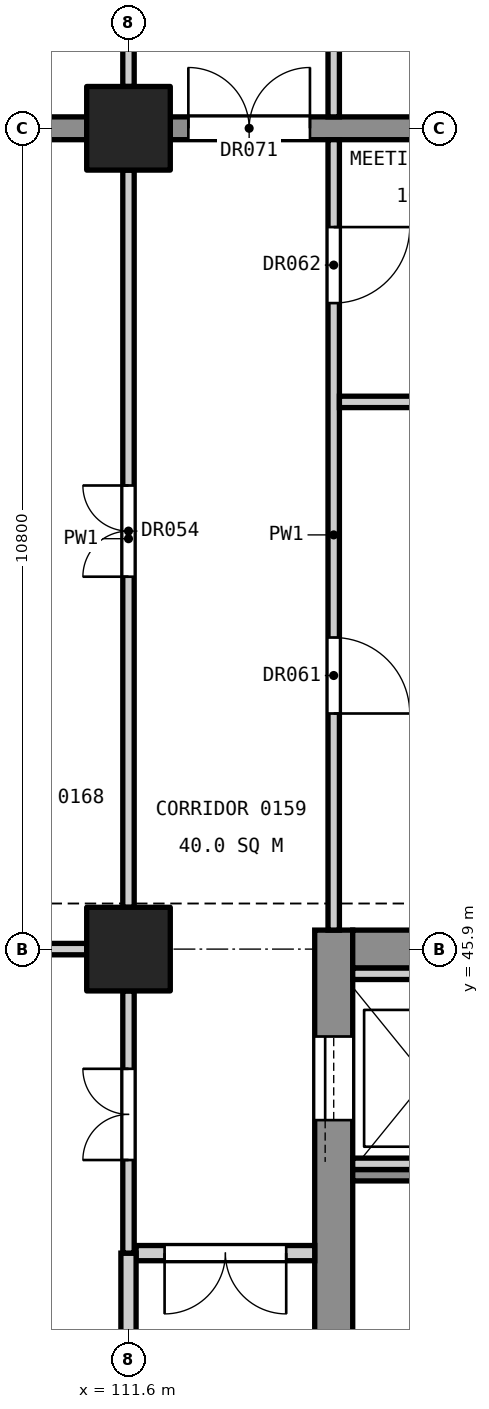
"""IFC4 building model, lengths in metres.
Left out: names, types, materials, properties, quantities, classifications, styles, units other than length and angle.
Written with IfcOpenShell. Run it as: python <this file> out.ifc"""

import sys

from ifc_helpers import new_model, si_unit, direction, frame, frame_2d, origin, origin_2d, place, context, subcontext, project, spatial, rectangle, extrude, element, fill, save


model = new_model("IFC4")
c1 = context("Model", 3, precision=1e-05, world=origin(), true_north=direction((0.0, 1.0)))
c2 = subcontext(c1, "Body", "Model", "MODEL_VIEW")
j1 = project(units=[si_unit("LENGTHUNIT", "METRE"), si_unit("PLANEANGLEUNIT", "RADIAN")], contexts=[c1])
p1 = place(None, origin())
s1 = spatial("IfcSite", under=j1, at=p1, CompositionType="ELEMENT")
p2 = place(p1, origin())
s2 = spatial("IfcBuilding", under=s1, at=p2, CompositionType="ELEMENT")
p3 = place(p2, frame((0.0, 0.0, 6.0)))
s3 = spatial("IfcBuildingStorey", under=s2, at=p3, CompositionType="ELEMENT", Elevation=6.0)
for number, where, z_axis, x_axis in (
    (1, (111.6, 45.9, 0.0), (0.0, 0.0, 1.0), (1.0, 0.0, 0.0)),
    (2, (111.6, 56.7, 0.0), (0.0, 0.0, 1.0), (1.0, 0.0, 0.0)),
):
    element("IfcColumn", number, at=place(p3, frame(where, z_axis=z_axis, x_axis=x_axis)), inside=s3, PredefinedType="COLUMN", context=c2, shape_type="SweptSolid", body=[
        extrude(rectangle(XDim=1.1, YDim=1.1, at=origin_2d()), origin(), (0.0, 0.0, 1.0), 5.4),
    ])
p4 = place(p3, frame((114.3, 34.85, 0.0), z_axis=(0.0, 0.0, 1.0), x_axis=(0.0, 1.0, 0.0)))
e3 = element("IfcWall", 3, at=p4, inside=s3, PredefinedType="SHEAR", context=c2, shape_type="SweptSolid", body=[
    extrude(rectangle(XDim=11.3, YDim=0.5, at=frame_2d((5.65, 0.0))), origin(), (0.0, 0.0, 1.0), 5.1),
])
p5 = place(p4, frame((0.55, 0.0, 0.0)))
e4 = element("IfcOpeningElement", 4, at=p5, cuts=e3, PredefinedType="OPENING", context=c2, shape_type="SweptSolid", body=[
    extrude(rectangle(XDim=1.4, YDim=2.1, at=frame_2d((0.7, 1.05))), frame((0.0, 0.26, 0.0), z_axis=(0.0, -1.0, 0.0), x_axis=(1.0, 0.0, 0.0)), (0.0, 0.0, 1.0), 0.52),
])
p6 = place(p4, frame((8.8, 0.0, 0.0)))
e5 = element("IfcOpeningElement", 5, at=p6, cuts=e3, PredefinedType="OPENING", context=c2, shape_type="SweptSolid", body=[
    extrude(rectangle(XDim=1.1, YDim=2.1, at=frame_2d((0.55, 1.05))), frame((0.0, 0.26, 0.0), z_axis=(0.0, -1.0, 0.0), x_axis=(1.0, 0.0, 0.0)), (0.0, 0.0, 1.0), 0.52),
])
p7 = place(p3, frame((118.55, 45.9, 0.0), z_axis=(0.0, 0.0, 1.0), x_axis=(-1.0, 0.0, 0.0)))
e6 = element("IfcWall", 6, at=p7, inside=s3, PredefinedType="SHEAR", context=c2, shape_type="SweptSolid", body=[
    extrude(rectangle(XDim=4.0, YDim=0.5, at=frame_2d((2.0, 0.0))), origin(), (0.0, 0.0, 1.0), 5.1),
])
p8 = place(p3, frame((118.25, 56.7, 0.0), z_axis=(0.0, 0.0, 1.0), x_axis=(-1.0, 0.0, 0.0)))
e7 = element("IfcWall", 7, at=p8, inside=s3, PredefinedType="SHEAR", context=c2, shape_type="SweptSolid", body=[
    extrude(rectangle(XDim=6.1, YDim=0.3, at=frame_2d((3.05, 0.0))), origin(), (0.0, 0.0, 1.0), 5.1),
])
p9 = place(p8, frame((4.262, 0.0, 0.0)))
e8 = element("IfcOpeningElement", 8, at=p9, cuts=e7, PredefinedType="OPENING", context=c2, shape_type="SweptSolid", body=[
    extrude(rectangle(XDim=1.6, YDim=2.1, at=frame_2d((0.8, 1.05))), frame((0.0, 0.16, 0.0), z_axis=(0.0, -1.0, 0.0), x_axis=(1.0, 0.0, 0.0)), (0.0, 0.0, 1.0), 0.32),
])
p10 = place(p3, frame((111.05, 56.7, 0.0), z_axis=(0.0, 0.0, 1.0), x_axis=(-1.0, 0.0, 0.0)))
e9 = element("IfcWall", 9, at=p10, inside=s3, PredefinedType="SHEAR", context=c2, shape_type="SweptSolid", body=[
    extrude(rectangle(XDim=9.7, YDim=0.3, at=frame_2d((4.85, 0.0))), origin(), (0.0, 0.0, 1.0), 5.1),
])
p11 = place(p3, frame((118.55, 42.925, 0.0), z_axis=(0.0, 0.0, 1.0), x_axis=(-1.0, 0.0, 0.0)))
e10 = element("IfcWall", 10, at=p11, inside=s3, PredefinedType="SOLIDWALL", context=c2, shape_type="SweptSolid", body=[
    extrude(rectangle(XDim=4.0, YDim=0.15, at=frame_2d((2.0, 0.0))), origin(), (0.0, 0.0, 1.0), 5.1),
])
for number, where, z_axis, x_axis in (
    (11, (116.35, 43.075, 0.0), (0.0, 0.0, 1.0), (-1.0, 0.0, 0.0)),
    (12, (116.35, 45.575, 0.0), (0.0, 0.0, 1.0), (-1.0, 0.0, 0.0)),
):
    element("IfcWall", number, at=place(p3, frame(where, z_axis=z_axis, x_axis=x_axis)), inside=s3, PredefinedType="SOLIDWALL", context=c2, shape_type="SweptSolid", body=[
        extrude(rectangle(XDim=1.8, YDim=0.15, at=frame_2d((0.9, 0.0))), origin(), (0.0, 0.0, 1.0), 5.4),
    ])
p12 = place(p3, frame((114.3, 46.15, 0.0), z_axis=(0.0, 0.0, 1.0), x_axis=(0.0, 1.0, 0.0)))
e13 = element("IfcWall", 13, at=p12, inside=s3, PredefinedType="PARTITIONING", context=c2, shape_type="SweptSolid", body=[
    extrude(rectangle(XDim=10.4, YDim=0.15, at=frame_2d((5.2, 0.0))), origin(), (0.0, 0.0, 1.0), 4.0),
])
p13 = place(p12, frame((2.85, 0.0, 0.0)))
e14 = element("IfcOpeningElement", 14, at=p13, cuts=e13, PredefinedType="OPENING", context=c2, shape_type="SweptSolid", body=[
    extrude(rectangle(XDim=1.0, YDim=2.1, at=frame_2d((0.5, 1.05))), frame((0.0, 0.085, 0.0), z_axis=(0.0, -1.0, 0.0), x_axis=(1.0, 0.0, 0.0)), (0.0, 0.0, 1.0), 0.17),
])
p14 = place(p12, frame((8.25, 0.0, 0.0)))
e15 = element("IfcOpeningElement", 15, at=p14, cuts=e13, PredefinedType="OPENING", context=c2, shape_type="SweptSolid", body=[
    extrude(rectangle(XDim=1.0, YDim=2.1, at=frame_2d((0.5, 1.05))), frame((0.0, 0.085, 0.0), z_axis=(0.0, -1.0, 0.0), x_axis=(1.0, 0.0, 0.0)), (0.0, 0.0, 1.0), 0.17),
])
p15 = place(p3, frame((114.3, 56.85, 0.0), z_axis=(0.0, 0.0, 1.0), x_axis=(0.0, 1.0, 0.0)))
e16 = element("IfcWall", 16, at=p15, inside=s3, PredefinedType="PARTITIONING", context=c2, shape_type="SweptSolid", body=[
    extrude(rectangle(XDim=3.2, YDim=0.15, at=frame_2d((1.6, 0.0))), origin(), (0.0, 0.0, 1.0), 4.0),
])
p16 = place(p15, frame((1.15, 0.0, 0.0)))
e17 = element("IfcOpeningElement", 17, at=p16, cuts=e16, PredefinedType="OPENING", context=c2, shape_type="SweptSolid", body=[
    extrude(rectangle(XDim=1.0, YDim=2.1, at=frame_2d((0.5, 1.05))), frame((0.0, 0.085, 0.0), z_axis=(0.0, -1.0, 0.0), x_axis=(1.0, 0.0, 0.0)), (0.0, 0.0, 1.0), 0.17),
])
p17 = place(p3, frame((118.65, 53.1, 0.0), z_axis=(0.0, 0.0, 1.0), x_axis=(-1.0, 0.0, 0.0)))
e18 = element("IfcWall", 18, at=p17, inside=s3, PredefinedType="PARTITIONING", context=c2, shape_type="SweptSolid", body=[
    extrude(rectangle(XDim=4.275, YDim=0.15, at=frame_2d((2.137, 0.0))), origin(), (0.0, 0.0, 1.0), 4.3),
])
p18 = place(p3, frame((114.05, 41.9, 0.0), z_axis=(0.0, 0.0, 1.0), x_axis=(-1.0, 0.0, 0.0)))
e19 = element("IfcWall", 19, at=p18, inside=s3, PredefinedType="PARTITIONING", context=c2, shape_type="SweptSolid", body=[
    extrude(rectangle(XDim=2.35, YDim=0.2, at=frame_2d((1.175, 0.0))), origin(), (0.0, 0.0, 1.0), 4.0),
])
p19 = place(p18, frame((0.375, 0.0, 0.0)))
e20 = element("IfcOpeningElement", 20, at=p19, cuts=e19, PredefinedType="OPENING", context=c2, shape_type="SweptSolid", body=[
    extrude(rectangle(XDim=1.6, YDim=2.1, at=frame_2d((0.8, 1.05))), frame((0.0, 0.11, 0.0), z_axis=(0.0, -1.0, 0.0), x_axis=(1.0, 0.0, 0.0)), (0.0, 0.0, 1.0), 0.22),
])
p20 = place(p3, frame((111.6, 35.65, 0.0), z_axis=(0.0, 0.0, 1.0), x_axis=(0.0, 1.0, 0.0)))
e21 = element("IfcWall", 21, at=p20, inside=s3, PredefinedType="PARTITIONING", context=c2, shape_type="SweptSolid", body=[
    extrude(rectangle(XDim=6.25, YDim=0.2, at=frame_2d((3.125, 0.0))), origin(), (0.0, 0.0, 1.0), 4.0),
])
p21 = place(p3, frame((111.6, 41.9, 0.0), z_axis=(0.0, 0.0, 1.0), x_axis=(0.0, 1.0, 0.0)))
e22 = element("IfcWall", 22, at=p21, inside=s3, PredefinedType="PARTITIONING", context=c2, shape_type="SweptSolid", body=[
    extrude(rectangle(XDim=3.45, YDim=0.15, at=frame_2d((1.725, 0.0))), origin(), (0.0, 0.0, 1.0), 4.0),
])
p22 = place(p21, frame((1.225, 0.0, 0.0)))
e23 = element("IfcOpeningElement", 23, at=p22, cuts=e22, PredefinedType="OPENING", context=c2, shape_type="SweptSolid", body=[
    extrude(rectangle(XDim=1.2, YDim=2.1, at=frame_2d((0.6, 1.05))), frame((0.0, 0.085, 0.0), z_axis=(0.0, -1.0, 0.0), x_axis=(1.0, 0.0, 0.0)), (0.0, 0.0, 1.0), 0.17),
])
p23 = place(p3, frame((111.6, 46.45, 0.0), z_axis=(0.0, 0.0, 1.0), x_axis=(0.0, 1.0, 0.0)))
e24 = element("IfcWall", 24, at=p23, inside=s3, PredefinedType="PARTITIONING", context=c2, shape_type="SweptSolid", body=[
    extrude(rectangle(XDim=9.7, YDim=0.15, at=frame_2d((4.85, 0.0))), origin(), (0.0, 0.0, 1.0), 4.0),
])
p24 = place(p23, frame((4.35, 0.0, 0.0)))
e25 = element("IfcOpeningElement", 25, at=p24, cuts=e24, PredefinedType="OPENING", context=c2, shape_type="SweptSolid", body=[
    extrude(rectangle(XDim=1.2, YDim=2.1, at=frame_2d((0.6, 1.05))), frame((0.0, 0.085, 0.0), z_axis=(0.0, -1.0, 0.0), x_axis=(1.0, 0.0, 0.0)), (0.0, 0.0, 1.0), 0.17),
])
p25 = place(p3, frame((111.6, 57.25, 0.0), z_axis=(0.0, 0.0, 1.0), x_axis=(0.0, 1.0, 0.0)))
e26 = element("IfcWall", 26, at=p25, inside=s3, PredefinedType="PARTITIONING", context=c2, shape_type="SweptSolid", body=[
    extrude(rectangle(XDim=3.05, YDim=0.15, at=frame_2d((1.525, 0.0))), origin(), (0.0, 0.0, 1.0), 4.0),
])
p26 = place(p25, frame((1.025, 0.0, 0.0)))
e27 = element("IfcOpeningElement", 27, at=p26, cuts=e26, PredefinedType="OPENING", context=c2, shape_type="SweptSolid", body=[
    extrude(rectangle(XDim=1.2, YDim=2.1, at=frame_2d((0.6, 1.05))), frame((0.0, 0.085, 0.0), z_axis=(0.0, -1.0, 0.0), x_axis=(1.0, 0.0, 0.0)), (0.0, 0.0, 1.0), 0.17),
])
p27 = place(p3, frame((111.05, 45.9, 0.0), z_axis=(0.0, 0.0, 1.0), x_axis=(-1.0, 0.0, 0.0)))
e28 = element("IfcWall", 28, at=p27, inside=s3, PredefinedType="PARTITIONING", context=c2, shape_type="SweptSolid", body=[
    extrude(rectangle(XDim=9.7, YDim=0.15, at=frame_2d((4.85, 0.0))), origin(), (0.0, 0.0, 1.0), 4.3),
])
p28 = place(p6, origin())
e29 = element("IfcDoor", 29, at=p28, inside=s3, OperationType="SLIDING_TO_LEFT", PredefinedType="DOOR", context=c2, shape_type="SweptSolid", body=[
    extrude(rectangle(XDim=1.1, YDim=2.1, at=frame_2d((0.55, 1.05))), frame((0.0, 0.025, 0.0), z_axis=(0.0, -1.0, 0.0), x_axis=(1.0, 0.0, 0.0)), (0.0, 0.0, 1.0), 0.05),
])
fill(e5, e29)
p29 = place(p22, origin())
e30 = element("IfcDoor", 30, at=p29, inside=s3, OperationType="DOUBLE_DOOR_SINGLE_SWING", PredefinedType="DOOR", context=c2, shape_type="SweptSolid", body=[
    extrude(rectangle(XDim=1.2, YDim=2.1, at=frame_2d((0.6, 1.05))), frame((0.0, 0.025, 0.0), z_axis=(0.0, -1.0, 0.0), x_axis=(1.0, 0.0, 0.0)), (0.0, 0.0, 1.0), 0.05),
])
fill(e23, e30)
p30 = place(p24, origin())
e31 = element("IfcDoor", 31, at=p30, inside=s3, OperationType="DOUBLE_DOOR_SINGLE_SWING", PredefinedType="DOOR", context=c2, shape_type="SweptSolid", body=[
    extrude(rectangle(XDim=1.2, YDim=2.1, at=frame_2d((0.6, 1.05))), frame((0.0, 0.025, 0.0), z_axis=(0.0, -1.0, 0.0), x_axis=(1.0, 0.0, 0.0)), (0.0, 0.0, 1.0), 0.05),
])
fill(e25, e31)
p31 = place(p13, frame((1.0, 0.0, 0.0), z_axis=(0.0, 0.0, 1.0), x_axis=(-1.0, 0.0, 0.0)))
e32 = element("IfcDoor", 32, at=p31, inside=s3, OperationType="SINGLE_SWING_RIGHT", PredefinedType="DOOR", context=c2, shape_type="SweptSolid", body=[
    extrude(rectangle(XDim=1.0, YDim=2.1, at=frame_2d((0.5, 1.05))), frame((0.0, 0.025, 0.0), z_axis=(0.0, -1.0, 0.0), x_axis=(1.0, 0.0, 0.0)), (0.0, 0.0, 1.0), 0.05),
])
fill(e14, e32)
p32 = place(p14, frame((1.0, 0.0, 0.0), z_axis=(0.0, 0.0, 1.0), x_axis=(-1.0, 0.0, 0.0)))
e33 = element("IfcDoor", 33, at=p32, inside=s3, OperationType="SINGLE_SWING_LEFT", PredefinedType="DOOR", context=c2, shape_type="SweptSolid", body=[
    extrude(rectangle(XDim=1.0, YDim=2.1, at=frame_2d((0.5, 1.05))), frame((0.0, 0.025, 0.0), z_axis=(0.0, -1.0, 0.0), x_axis=(1.0, 0.0, 0.0)), (0.0, 0.0, 1.0), 0.05),
])
fill(e15, e33)
p33 = place(p19, origin())
e34 = element("IfcDoor", 34, at=p33, inside=s3, OperationType="DOUBLE_DOOR_SINGLE_SWING", PredefinedType="DOOR", context=c2, shape_type="SweptSolid", body=[
    extrude(rectangle(XDim=1.6, YDim=2.1, at=frame_2d((0.8, 1.05))), frame((0.0, 0.025, 0.0), z_axis=(0.0, -1.0, 0.0), x_axis=(1.0, 0.0, 0.0)), (0.0, 0.0, 1.0), 0.05),
])
fill(e20, e34)
p34 = place(p9, frame((1.6, 0.0, 0.0), z_axis=(0.0, 0.0, 1.0), x_axis=(-1.0, 0.0, 0.0)))
e35 = element("IfcDoor", 35, at=p34, inside=s3, OperationType="DOUBLE_DOOR_SINGLE_SWING", PredefinedType="DOOR", context=c2, shape_type="SweptSolid", body=[
    extrude(rectangle(XDim=1.6, YDim=2.1, at=frame_2d((0.8, 1.05))), frame((0.0, 0.025, 0.0), z_axis=(0.0, -1.0, 0.0), x_axis=(1.0, 0.0, 0.0)), (0.0, 0.0, 1.0), 0.05),
])
fill(e8, e35)
save(model, sys.argv[1])
